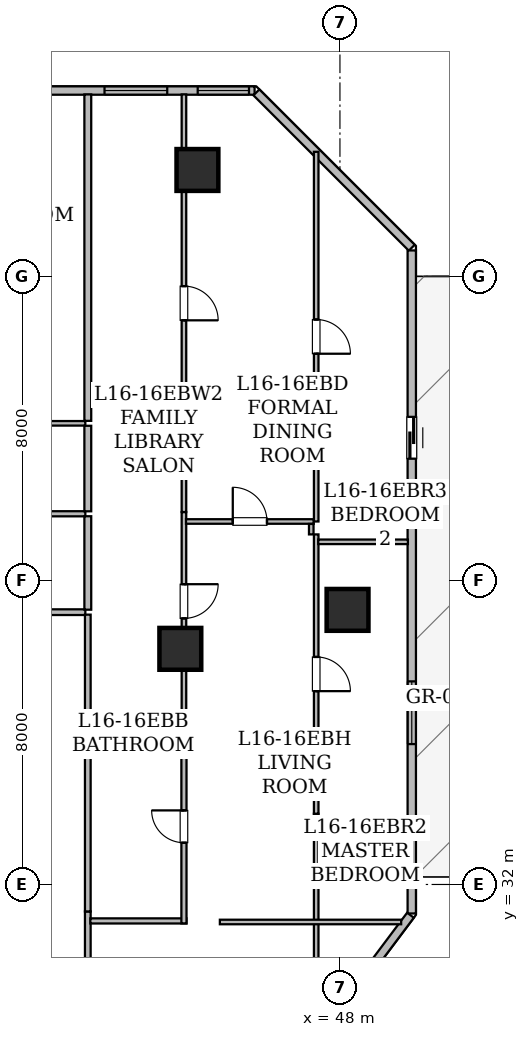
"""IFC4 building model, lengths in metres.
Left out: names, types, materials, properties, quantities, classifications, styles, units other than length and angle.
Written with IfcOpenShell. Run it as: python <this file> out.ifc"""

import sys

from ifc_helpers import new_model, si_unit, direction, frame, frame_2d, origin, origin_2d, place, context, subcontext, project, spatial, rectangle, hollow_rectangle, extrude, element, fill, save


model = new_model("IFC4")
c1 = context("Model", 3, precision=1e-05, world=origin(), true_north=direction((0.0, 1.0)))
c2 = subcontext(c1, "Body", "Model", "MODEL_VIEW")
j1 = project(units=[si_unit("LENGTHUNIT", "METRE"), si_unit("PLANEANGLEUNIT", "RADIAN")], contexts=[c1])
p1 = place(None, origin())
s1 = spatial("IfcSite", under=j1, at=p1, CompositionType="ELEMENT")
p2 = place(p1, origin())
s2 = spatial("IfcBuilding", under=s1, at=p2, CompositionType="ELEMENT")
p3 = place(p2, frame((0.0, 0.0, 66.15)))
s3 = spatial("IfcBuildingStorey", under=s2, at=p3, CompositionType="ELEMENT", Elevation=66.15)
for number, where, z_axis, x_axis in (
    (1, (44.25, 50.8, 0.0), (0.0, 0.0, 1.0), (1.0, 0.0, 0.0)),
    (2, (48.2, 39.225, 0.0), (0.0, 0.0, 1.0), (1.0, 0.0, 0.0)),
    (3, (43.8, 38.2, 0.0), (0.0, 0.0, 1.0), (1.0, 0.0, 0.0)),
):
    element("IfcColumn", number, at=place(p3, frame(where, z_axis=z_axis, x_axis=x_axis)), inside=s3, PredefinedType="COLUMN", context=c2, shape_type="SweptSolid", body=[
        extrude(hollow_rectangle(XDim=1.1, YDim=1.1, WallThickness=0.055, at=origin_2d()), origin(), (0.0, 0.0, 1.0), 3.65),
    ])
p4 = place(p3, frame((8.315, 52.89, 0.0), z_axis=(0.0, 0.0, 1.0), x_axis=(1.0, 0.0, 0.0)))
e4 = element("IfcWall", 4, at=p4, inside=s3, PredefinedType="STANDARD", context=c2, shape_type="SweptSolid", body=[
    extrude(rectangle(XDim=37.439, YDim=0.22, at=frame_2d((18.719, 0.0))), origin(), (0.0, 0.0, 1.0), 3.43),
])
p5 = place(p4, frame((5.093, 0.0, 0.85)))
e5 = element("IfcOpeningElement", 5, at=p5, cuts=e4, PredefinedType="OPENING", context=c2, shape_type="SweptSolid", body=[
    extrude(rectangle(XDim=1.65, YDim=1.55, at=frame_2d((0.825, 0.775))), frame((0.0, 0.12, 0.0), z_axis=(0.0, -1.0, 0.0), x_axis=(1.0, 0.0, 0.0)), (0.0, 0.0, 1.0), 0.24),
])
p6 = place(p4, frame((13.055, 0.0, 0.8)))
e6 = element("IfcOpeningElement", 6, at=p6, cuts=e4, PredefinedType="OPENING", context=c2, shape_type="SweptSolid", body=[
    extrude(rectangle(XDim=1.2, YDim=1.5, at=frame_2d((0.6, 0.75))), frame((0.0, 0.12, 0.0), z_axis=(0.0, -1.0, 0.0), x_axis=(1.0, 0.0, 0.0)), (0.0, 0.0, 1.0), 0.24),
])
p7 = place(p4, frame((10.005, 0.0, 0.85)))
e7 = element("IfcOpeningElement", 7, at=p7, cuts=e4, PredefinedType="OPENING", context=c2, shape_type="SweptSolid", body=[
    extrude(rectangle(XDim=1.65, YDim=1.55, at=frame_2d((0.825, 0.775))), frame((0.0, 0.12, 0.0), z_axis=(0.0, -1.0, 0.0), x_axis=(1.0, 0.0, 0.0)), (0.0, 0.0, 1.0), 0.24),
])
p8 = place(p4, frame((15.655, 0.0, 0.85)))
e8 = element("IfcOpeningElement", 8, at=p8, cuts=e4, PredefinedType="OPENING", context=c2, shape_type="SweptSolid", body=[
    extrude(rectangle(XDim=1.65, YDim=1.55, at=frame_2d((0.825, 0.775))), frame((0.0, 0.12, 0.0), z_axis=(0.0, -1.0, 0.0), x_axis=(1.0, 0.0, 0.0)), (0.0, 0.0, 1.0), 0.24),
])
p9 = place(p4, frame((25.185, 0.0, 0.8)))
e9 = element("IfcOpeningElement", 9, at=p9, cuts=e4, PredefinedType="OPENING", context=c2, shape_type="SweptSolid", body=[
    extrude(rectangle(XDim=1.2, YDim=1.5, at=frame_2d((0.6, 0.75))), frame((0.0, 0.12, 0.0), z_axis=(0.0, -1.0, 0.0), x_axis=(1.0, 0.0, 0.0)), (0.0, 0.0, 1.0), 0.24),
])
p10 = place(p4, frame((20.935, 0.0, 0.85)))
e10 = element("IfcOpeningElement", 10, at=p10, cuts=e4, PredefinedType="OPENING", context=c2, shape_type="SweptSolid", body=[
    extrude(rectangle(XDim=1.65, YDim=1.55, at=frame_2d((0.825, 0.775))), frame((0.0, 0.12, 0.0), z_axis=(0.0, -1.0, 0.0), x_axis=(1.0, 0.0, 0.0)), (0.0, 0.0, 1.0), 0.24),
])
p11 = place(p4, frame((28.985, 0.0, 0.85)))
e11 = element("IfcOpeningElement", 11, at=p11, cuts=e4, PredefinedType="OPENING", context=c2, shape_type="SweptSolid", body=[
    extrude(rectangle(XDim=1.65, YDim=1.55, at=frame_2d((0.825, 0.775))), frame((0.0, 0.12, 0.0), z_axis=(0.0, -1.0, 0.0), x_axis=(1.0, 0.0, 0.0)), (0.0, 0.0, 1.0), 0.24),
])
p12 = place(p4, frame((33.49, 0.0, 0.85)))
e12 = element("IfcOpeningElement", 12, at=p12, cuts=e4, PredefinedType="OPENING", context=c2, shape_type="SweptSolid", body=[
    extrude(rectangle(XDim=1.65, YDim=1.55, at=frame_2d((0.825, 0.775))), frame((0.0, 0.12, 0.0), z_axis=(0.0, -1.0, 0.0), x_axis=(1.0, 0.0, 0.0)), (0.0, 0.0, 1.0), 0.24),
])
p13 = place(p4, frame((35.942, 0.0, 0.85)))
e13 = element("IfcOpeningElement", 13, at=p13, cuts=e4, PredefinedType="OPENING", context=c2, shape_type="SweptSolid", body=[
    extrude(rectangle(XDim=1.35, YDim=1.5, at=frame_2d((0.675, 0.75))), frame((0.0, 0.12, 0.0), z_axis=(0.0, -1.0, 0.0), x_axis=(1.0, 0.0, 0.0)), (0.0, 0.0, 1.0), 0.24),
])
p14 = place(p3, frame((45.802, 52.842, 0.0), z_axis=(0.0, 0.0, 1.0), x_axis=(0.707085666273, -0.70712789547, 0.0)))
e14 = element("IfcWall", 14, at=p14, inside=s3, PredefinedType="STANDARD", context=c2, shape_type="SweptSolid", body=[
    extrude(rectangle(XDim=5.781, YDim=0.22, at=frame_2d((2.891, 0.0))), origin(), (0.0, 0.0, 1.0), 3.43),
])
p15 = place(p3, frame((49.89, 48.683, 0.0), z_axis=(0.0, 0.0, 1.0), x_axis=(0.0, -1.0, 0.0)))
e15 = element("IfcWall", 15, at=p15, inside=s3, PredefinedType="STANDARD", context=c2, shape_type="SweptSolid", body=[
    extrude(rectangle(XDim=17.446, YDim=0.22, at=frame_2d((8.723, 0.0))), origin(), (0.0, 0.0, 1.0), 3.43),
])
p16 = place(p15, frame((4.379, 0.0, 0.0)))
e16 = element("IfcOpeningElement", 16, at=p16, cuts=e15, PredefinedType="OPENING", context=c2, shape_type="SweptSolid", body=[
    extrude(rectangle(XDim=1.1, YDim=2.2, at=frame_2d((0.55, 1.1))), frame((0.0, 0.12, 0.0), z_axis=(0.0, -1.0, 0.0), x_axis=(1.0, 0.0, 0.0)), (0.0, 0.0, 1.0), 0.24),
])
p17 = place(p15, frame((11.339, 0.0, 0.85)))
e17 = element("IfcOpeningElement", 17, at=p17, cuts=e15, PredefinedType="OPENING", context=c2, shape_type="SweptSolid", body=[
    extrude(rectangle(XDim=1.65, YDim=1.55, at=frame_2d((0.825, 0.775))), frame((0.0, 0.12, 0.0), z_axis=(0.0, -1.0, 0.0), x_axis=(1.0, 0.0, 0.0)), (0.0, 0.0, 1.0), 0.24),
])
p18 = place(p3, frame((49.856, 31.191, 0.0), z_axis=(0.0, 0.0, 1.0), x_axis=(-0.600137081448, -0.799897170561, 0.0)))
e18 = element("IfcWall", 18, at=p18, inside=s3, PredefinedType="STANDARD", context=c2, shape_type="SweptSolid", body=[
    extrude(rectangle(XDim=3.989, YDim=0.22, at=frame_2d((1.995, 0.0))), origin(), (0.0, 0.0, 1.0), 3.43),
])
p19 = place(p3, frame((34.299, 39.165, 0.0), z_axis=(0.0, 0.0, 1.0), x_axis=(1.0, 0.0, 0.0)))
e19 = element("IfcWall", 19, at=p19, inside=s3, PredefinedType="STANDARD", context=c2, shape_type="SweptSolid", body=[
    extrude(rectangle(XDim=7.001, YDim=0.15, at=frame_2d((3.5, 0.0))), origin(), (0.0, 0.0, 1.0), 3.43),
])
p20 = place(p3, frame((41.365, 39.1, 0.0), z_axis=(0.0, 0.0, 1.0), x_axis=(0.0, -1.0, 0.0)))
e20 = element("IfcWall", 20, at=p20, inside=s3, PredefinedType="STANDARD", context=c2, shape_type="SweptSolid", body=[
    extrude(rectangle(XDim=3.343, YDim=0.15, at=frame_2d((1.671, 0.0))), origin(), (0.0, 0.0, 1.0), 2.647),
])
p21 = place(p3, frame((41.365, 31.29, 0.0), z_axis=(0.0, 0.0, 1.0), x_axis=(0.0, -1.0, 0.0)))
e21 = element("IfcWall", 21, at=p21, inside=s3, PredefinedType="STANDARD", context=c2, shape_type="SweptSolid", body=[
    extrude(rectangle(XDim=2.698, YDim=0.15, at=frame_2d((1.349, 0.0))), origin(), (0.0, 0.0, 1.0), 3.43),
])
p22 = place(p3, frame((41.365, 35.757, 0.0), z_axis=(0.0, 0.0, 1.0), x_axis=(0.0, -1.0, 0.0)))
e22 = element("IfcWall", 22, at=p22, inside=s3, PredefinedType="STANDARD", context=c2, shape_type="SweptSolid", body=[
    extrude(rectangle(XDim=4.467, YDim=0.15, at=frame_2d((2.233, 0.0))), origin(), (0.0, 0.0, 1.0), 3.43),
])
p23 = place(p3, frame((41.3, 41.754, 0.0), z_axis=(0.0, 0.0, 1.0), x_axis=(-1.0, 0.0, 0.0)))
e23 = element("IfcWall", 23, at=p23, inside=s3, PredefinedType="PARTITIONING", context=c2, shape_type="SweptSolid", body=[
    extrude(rectangle(XDim=7.315, YDim=0.135, at=frame_2d((3.657, 0.0))), origin(), (0.0, 0.0, 1.0), 3.43),
])
p24 = place(p23, frame((3.233, 0.0, 0.0)))
e24 = element("IfcOpeningElement", 24, at=p24, cuts=e23, PredefinedType="OPENING", context=c2, shape_type="SweptSolid", body=[
    extrude(rectangle(XDim=0.85, YDim=2.1, at=frame_2d((0.425, 1.05))), frame((0.0, 0.077, 0.0), z_axis=(0.0, -1.0, 0.0), x_axis=(1.0, 0.0, 0.0)), (0.0, 0.0, 1.0), 0.155),
])
p25 = place(p3, frame((34.82, 44.134, 0.0), z_axis=(0.0, 0.0, 1.0), x_axis=(1.0, 0.0, 0.0)))
e25 = element("IfcWall", 25, at=p25, inside=s3, PredefinedType="PARTITIONING", context=c2, shape_type="SweptSolid", body=[
    extrude(rectangle(XDim=6.48, YDim=0.12, at=frame_2d((3.24, 0.0))), origin(), (0.0, 0.0, 1.0), 3.43),
])
p26 = place(p3, frame((41.365, 44.069, 0.0), z_axis=(0.0, 0.0, 1.0), x_axis=(0.0, -1.0, 0.0)))
e26 = element("IfcWall", 26, at=p26, inside=s3, PredefinedType="STANDARD", context=c2, shape_type="SweptSolid", body=[
    extrude(rectangle(XDim=2.25, YDim=0.18, at=frame_2d((1.125, 0.0))), origin(), (0.0, 0.0, 1.0), 3.065),
])
p27 = place(p3, frame((41.365, 41.689, 0.0), z_axis=(0.0, 0.0, 1.0), x_axis=(0.0, -1.0, 0.0)))
e27 = element("IfcWall", 27, at=p27, inside=s3, PredefinedType="STANDARD", context=c2, shape_type="SweptSolid", body=[
    extrude(rectangle(XDim=2.459, YDim=0.18, at=frame_2d((1.229, 0.0))), origin(), (0.0, 0.0, 1.0), 3.43),
])
p28 = place(p3, frame((41.365, 52.788, 0.0), z_axis=(0.0, 0.0, 1.0), x_axis=(0.0, -1.0, 0.0)))
e28 = element("IfcWall", 28, at=p28, inside=s3, PredefinedType="STANDARD", context=c2, shape_type="SweptSolid", body=[
    extrude(rectangle(XDim=8.589, YDim=0.18, at=frame_2d((4.294, 0.0))), origin(), (0.0, 0.0, 1.0), 2.803),
])
p29 = place(p3, frame((43.895, 41.8, 0.0), z_axis=(0.0, 0.0, 1.0), x_axis=(0.0, -1.0, 0.0)))
e29 = element("IfcWall", 29, at=p29, inside=s3, PredefinedType="PARTITIONING", context=c2, shape_type="SweptSolid", body=[
    extrude(rectangle(XDim=5.729, YDim=0.12, at=frame_2d((2.865, 0.0))), origin(), (0.0, 0.0, 1.0), 2.647),
])
p30 = place(p29, frame((1.899, 0.0, 0.0)))
e30 = element("IfcOpeningElement", 30, at=p30, cuts=e29, PredefinedType="OPENING", context=c2, shape_type="SweptSolid", body=[
    extrude(rectangle(XDim=0.9, YDim=2.1, at=frame_2d((0.45, 1.05))), frame((0.0, 0.07, 0.0), z_axis=(0.0, -1.0, 0.0), x_axis=(1.0, 0.0, 0.0)), (0.0, 0.0, 1.0), 0.14),
])
p31 = place(p3, frame((43.895, 52.788, 0.0), z_axis=(0.0, 0.0, 1.0), x_axis=(0.0, -1.0, 0.0)))
e31 = element("IfcWall", 31, at=p31, inside=s3, PredefinedType="PARTITIONING", context=c2, shape_type="SweptSolid", body=[
    extrude(rectangle(XDim=10.988, YDim=0.12, at=frame_2d((5.494, 0.0))), origin(), (0.0, 0.0, 1.0), 2.647),
])
p32 = place(p31, frame((5.044, 0.0, 0.0)))
e32 = element("IfcOpeningElement", 32, at=p32, cuts=e31, PredefinedType="OPENING", context=c2, shape_type="SweptSolid", body=[
    extrude(rectangle(XDim=0.9, YDim=2.1, at=frame_2d((0.45, 1.05))), frame((0.0, 0.07, 0.0), z_axis=(0.0, -1.0, 0.0), x_axis=(1.0, 0.0, 0.0)), (0.0, 0.0, 1.0), 0.14),
])
p33 = place(p3, frame((43.83, 36.006, 0.0), z_axis=(0.0, 0.0, 1.0), x_axis=(-1.0, 0.0, 0.0)))
e33 = element("IfcWall", 33, at=p33, inside=s3, PredefinedType="PARTITIONING", context=c2, shape_type="SweptSolid", body=[
    extrude(rectangle(XDim=2.398, YDim=0.135, at=frame_2d((1.199, 0.0))), origin(), (0.0, 0.0, 1.0), 2.647),
])
p34 = place(p3, frame((43.949, 41.551, 0.0), z_axis=(0.0, 0.0, 1.0), x_axis=(1.0, 0.0, 0.0)))
e34 = element("IfcWall", 34, at=p34, inside=s3, PredefinedType="PARTITIONING", context=c2, shape_type="SweptSolid", body=[
    extrude(rectangle(XDim=3.361, YDim=0.12, at=frame_2d((1.681, 0.0))), origin(), (0.0, 0.0, 1.0), 2.647),
])
p35 = place(p34, frame((1.231, 0.0, 0.0)))
e35 = element("IfcOpeningElement", 35, at=p35, cuts=e34, PredefinedType="OPENING", context=c2, shape_type="SweptSolid", body=[
    extrude(rectangle(XDim=0.9, YDim=2.1, at=frame_2d((0.45, 1.05))), frame((0.0, 0.07, 0.0), z_axis=(0.0, -1.0, 0.0), x_axis=(1.0, 0.0, 0.0)), (0.0, 0.0, 1.0), 0.14),
])
p36 = place(p3, frame((47.245, 41.486, 0.0), z_axis=(0.0, 0.0, 1.0), x_axis=(0.0, -1.0, 0.0)))
e36 = element("IfcWall", 36, at=p36, inside=s3, PredefinedType="PARTITIONING", context=c2, shape_type="SweptSolid", body=[
    extrude(rectangle(XDim=0.275, YDim=0.12, at=frame_2d((0.138, 0.0))), origin(), (0.0, 0.0, 1.0), 2.803),
])
p37 = place(p3, frame((41.432, 31.041, 0.0), z_axis=(0.0, 0.0, 1.0), x_axis=(1.0, 0.0, 0.0)))
e37 = element("IfcWall", 37, at=p37, inside=s3, PredefinedType="PARTITIONING", context=c2, shape_type="SweptSolid", body=[
    extrude(rectangle(XDim=2.528, YDim=0.135, at=frame_2d((1.264, 0.0))), origin(), (0.0, 0.0, 1.0), 2.647),
])
p38 = place(p3, frame((43.895, 30.976, 0.0), z_axis=(0.0, 0.0, 1.0), x_axis=(0.0, 1.0, 0.0)))
e38 = element("IfcWall", 38, at=p38, inside=s3, PredefinedType="PARTITIONING", context=c2, shape_type="SweptSolid", body=[
    extrude(rectangle(XDim=5.095, YDim=0.135, at=frame_2d((2.547, 0.0))), origin(), (0.0, 0.0, 1.0), 2.647),
])
p39 = place(p38, frame((2.123, 0.0, 0.0)))
e39 = element("IfcOpeningElement", 39, at=p39, cuts=e38, PredefinedType="OPENING", context=c2, shape_type="SweptSolid", body=[
    extrude(rectangle(XDim=0.85, YDim=2.1, at=frame_2d((0.425, 1.05))), frame((0.0, 0.077, 0.0), z_axis=(0.0, -1.0, 0.0), x_axis=(1.0, 0.0, 0.0)), (0.0, 0.0, 1.0), 0.155),
])
p40 = place(p3, frame((47.375, 33.862, 0.0), z_axis=(0.0, 0.0, 1.0), x_axis=(0.0, -1.0, 0.0)))
e40 = element("IfcWall", 40, at=p40, inside=s3, PredefinedType="PARTITIONING", context=c2, shape_type="SweptSolid", body=[
    extrude(rectangle(XDim=10.98, YDim=0.12, at=frame_2d((5.49, 0.0))), origin(), (0.0, 0.0, 1.0), 3.065),
])
p41 = place(p40, frame((7.203, 0.0, 0.0)))
e41 = element("IfcOpeningElement", 41, at=p41, cuts=e40, PredefinedType="OPENING", context=c2, shape_type="SweptSolid", body=[
    extrude(rectangle(XDim=0.9, YDim=2.1, at=frame_2d((0.45, 1.05))), frame((0.0, 0.07, 0.0), z_axis=(0.0, -1.0, 0.0), x_axis=(1.0, 0.0, 0.0)), (0.0, 0.0, 1.0), 0.14),
])
p42 = place(p3, frame((47.375, 41.211, 0.0), z_axis=(0.0, 0.0, 1.0), x_axis=(0.0, -1.0, 0.0)))
e42 = element("IfcWall", 42, at=p42, inside=s3, PredefinedType="PARTITIONING", context=c2, shape_type="SweptSolid", body=[
    extrude(rectangle(XDim=7.349, YDim=0.12, at=frame_2d((3.674, 0.0))), origin(), (0.0, 0.0, 1.0), 2.647),
])
p43 = place(p42, frame((3.224, 0.0, 0.0)))
e43 = element("IfcOpeningElement", 43, at=p43, cuts=e42, PredefinedType="OPENING", context=c2, shape_type="SweptSolid", body=[
    extrude(rectangle(XDim=0.9, YDim=2.1, at=frame_2d((0.45, 1.05))), frame((0.0, 0.07, 0.0), z_axis=(0.0, -1.0, 0.0), x_axis=(1.0, 0.0, 0.0)), (0.0, 0.0, 1.0), 0.14),
])
p44 = place(p3, frame((47.375, 51.278, 0.0), z_axis=(0.0, 0.0, 1.0), x_axis=(0.0, -1.0, 0.0)))
e44 = element("IfcWall", 44, at=p44, inside=s3, PredefinedType="PARTITIONING", context=c2, shape_type="SweptSolid", body=[
    extrude(rectangle(XDim=9.727, YDim=0.12, at=frame_2d((4.864, 0.0))), origin(), (0.0, 0.0, 1.0), 2.803),
])
p45 = place(p44, frame((4.413, 0.0, 0.0)))
e45 = element("IfcOpeningElement", 45, at=p45, cuts=e44, PredefinedType="OPENING", context=c2, shape_type="SweptSolid", body=[
    extrude(rectangle(XDim=0.9, YDim=2.1, at=frame_2d((0.45, 1.05))), frame((0.0, 0.07, 0.0), z_axis=(0.0, -1.0, 0.0), x_axis=(1.0, 0.0, 0.0)), (0.0, 0.0, 1.0), 0.14),
])
p46 = place(p3, frame((44.84, 31.013, 0.0), z_axis=(0.0, 0.0, 1.0), x_axis=(1.0, 0.0, 0.0)))
e46 = element("IfcWall", 46, at=p46, inside=s3, PredefinedType="PARTITIONING", context=c2, shape_type="SweptSolid", body=[
    extrude(rectangle(XDim=4.771, YDim=0.12, at=frame_2d((2.385, 0.0))), origin(), (0.0, 0.0, 1.0), 2.803),
])
p47 = place(p3, frame((47.429, 41.016, 0.0), z_axis=(0.0, 0.0, 1.0), x_axis=(1.0, 0.0, 0.0)))
e47 = element("IfcWall", 47, at=p47, inside=s3, PredefinedType="PARTITIONING", context=c2, shape_type="SweptSolid", body=[
    extrude(rectangle(XDim=2.359, YDim=0.12, at=frame_2d((1.18, 0.0))), origin(), (0.0, 0.0, 1.0), 2.803),
])
p48 = place(p16, origin())
e48 = element("IfcDoor", 48, at=p48, inside=s3, OperationType="SLIDING_TO_LEFT", PredefinedType="DOOR", context=c2, shape_type="SweptSolid", body=[
    extrude(rectangle(XDim=1.1, YDim=2.2, at=frame_2d((0.55, 1.1))), frame((0.0, 0.025, 0.0), z_axis=(0.0, -1.0, 0.0), x_axis=(1.0, 0.0, 0.0)), (0.0, 0.0, 1.0), 0.05),
])
fill(e16, e48)
p49 = place(p12, origin())
e49 = element("IfcWindow", 49, at=p49, inside=s3, PartitioningType="SINGLE_PANEL", PredefinedType="WINDOW", context=c2, shape_type="SweptSolid", body=[
    extrude(rectangle(XDim=1.65, YDim=1.55, at=frame_2d((0.825, 0.775))), frame((0.0, 0.03, 0.0), z_axis=(0.0, -1.0, 0.0), x_axis=(1.0, 0.0, 0.0)), (0.0, 0.0, 1.0), 0.06),
])
fill(e12, e49)
p50 = place(p13, origin())
e50 = element("IfcWindow", 50, at=p50, inside=s3, PartitioningType="SINGLE_PANEL", PredefinedType="WINDOW", context=c2, shape_type="SweptSolid", body=[
    extrude(rectangle(XDim=1.35, YDim=1.5, at=frame_2d((0.675, 0.75))), frame((0.0, 0.03, 0.0), z_axis=(0.0, -1.0, 0.0), x_axis=(1.0, 0.0, 0.0)), (0.0, 0.0, 1.0), 0.06),
])
fill(e13, e50)
p51 = place(p17, origin())
e51 = element("IfcWindow", 51, at=p51, inside=s3, PartitioningType="SINGLE_PANEL", PredefinedType="WINDOW", context=c2, shape_type="SweptSolid", body=[
    extrude(rectangle(XDim=1.65, YDim=1.55, at=frame_2d((0.825, 0.775))), frame((0.0, 0.03, 0.0), z_axis=(0.0, -1.0, 0.0), x_axis=(1.0, 0.0, 0.0)), (0.0, 0.0, 1.0), 0.06),
])
fill(e17, e51)
p52 = place(p30, origin())
e52 = element("IfcDoor", 52, at=p52, inside=s3, OperationType="SINGLE_SWING_LEFT", PredefinedType="DOOR", context=c2, shape_type="SweptSolid", body=[
    extrude(rectangle(XDim=0.9, YDim=2.1, at=frame_2d((0.45, 1.05))), frame((0.0, 0.025, 0.0), z_axis=(0.0, -1.0, 0.0), x_axis=(1.0, 0.0, 0.0)), (0.0, 0.0, 1.0), 0.05),
])
fill(e30, e52)
p53 = place(p32, origin())
e53 = element("IfcDoor", 53, at=p53, inside=s3, OperationType="SINGLE_SWING_RIGHT", PredefinedType="DOOR", context=c2, shape_type="SweptSolid", body=[
    extrude(rectangle(XDim=0.9, YDim=2.1, at=frame_2d((0.45, 1.05))), frame((0.0, 0.025, 0.0), z_axis=(0.0, -1.0, 0.0), x_axis=(1.0, 0.0, 0.0)), (0.0, 0.0, 1.0), 0.05),
])
fill(e32, e53)
p54 = place(p35, origin())
e54 = element("IfcDoor", 54, at=p54, inside=s3, OperationType="SINGLE_SWING_LEFT", PredefinedType="DOOR", context=c2, shape_type="SweptSolid", body=[
    extrude(rectangle(XDim=0.9, YDim=2.1, at=frame_2d((0.45, 1.05))), frame((0.0, 0.025, 0.0), z_axis=(0.0, -1.0, 0.0), x_axis=(1.0, 0.0, 0.0)), (0.0, 0.0, 1.0), 0.05),
])
fill(e35, e54)
p55 = place(p39, origin())
e55 = element("IfcDoor", 55, at=p55, inside=s3, OperationType="SINGLE_SWING_RIGHT", PredefinedType="DOOR", context=c2, shape_type="SweptSolid", body=[
    extrude(rectangle(XDim=0.85, YDim=2.1, at=frame_2d((0.425, 1.05))), frame((0.0, 0.025, 0.0), z_axis=(0.0, -1.0, 0.0), x_axis=(1.0, 0.0, 0.0)), (0.0, 0.0, 1.0), 0.05),
])
fill(e39, e55)
p56 = place(p43, origin())
e56 = element("IfcDoor", 56, at=p56, inside=s3, OperationType="SINGLE_SWING_RIGHT", PredefinedType="DOOR", context=c2, shape_type="SweptSolid", body=[
    extrude(rectangle(XDim=0.9, YDim=2.1, at=frame_2d((0.45, 1.05))), frame((0.0, 0.025, 0.0), z_axis=(0.0, -1.0, 0.0), x_axis=(1.0, 0.0, 0.0)), (0.0, 0.0, 1.0), 0.05),
])
fill(e43, e56)
p57 = place(p45, origin())
e57 = element("IfcDoor", 57, at=p57, inside=s3, OperationType="SINGLE_SWING_RIGHT", PredefinedType="DOOR", context=c2, shape_type="SweptSolid", body=[
    extrude(rectangle(XDim=0.9, YDim=2.1, at=frame_2d((0.45, 1.05))), frame((0.0, 0.025, 0.0), z_axis=(0.0, -1.0, 0.0), x_axis=(1.0, 0.0, 0.0)), (0.0, 0.0, 1.0), 0.05),
])
fill(e45, e57)
save(model, sys.argv[1])
